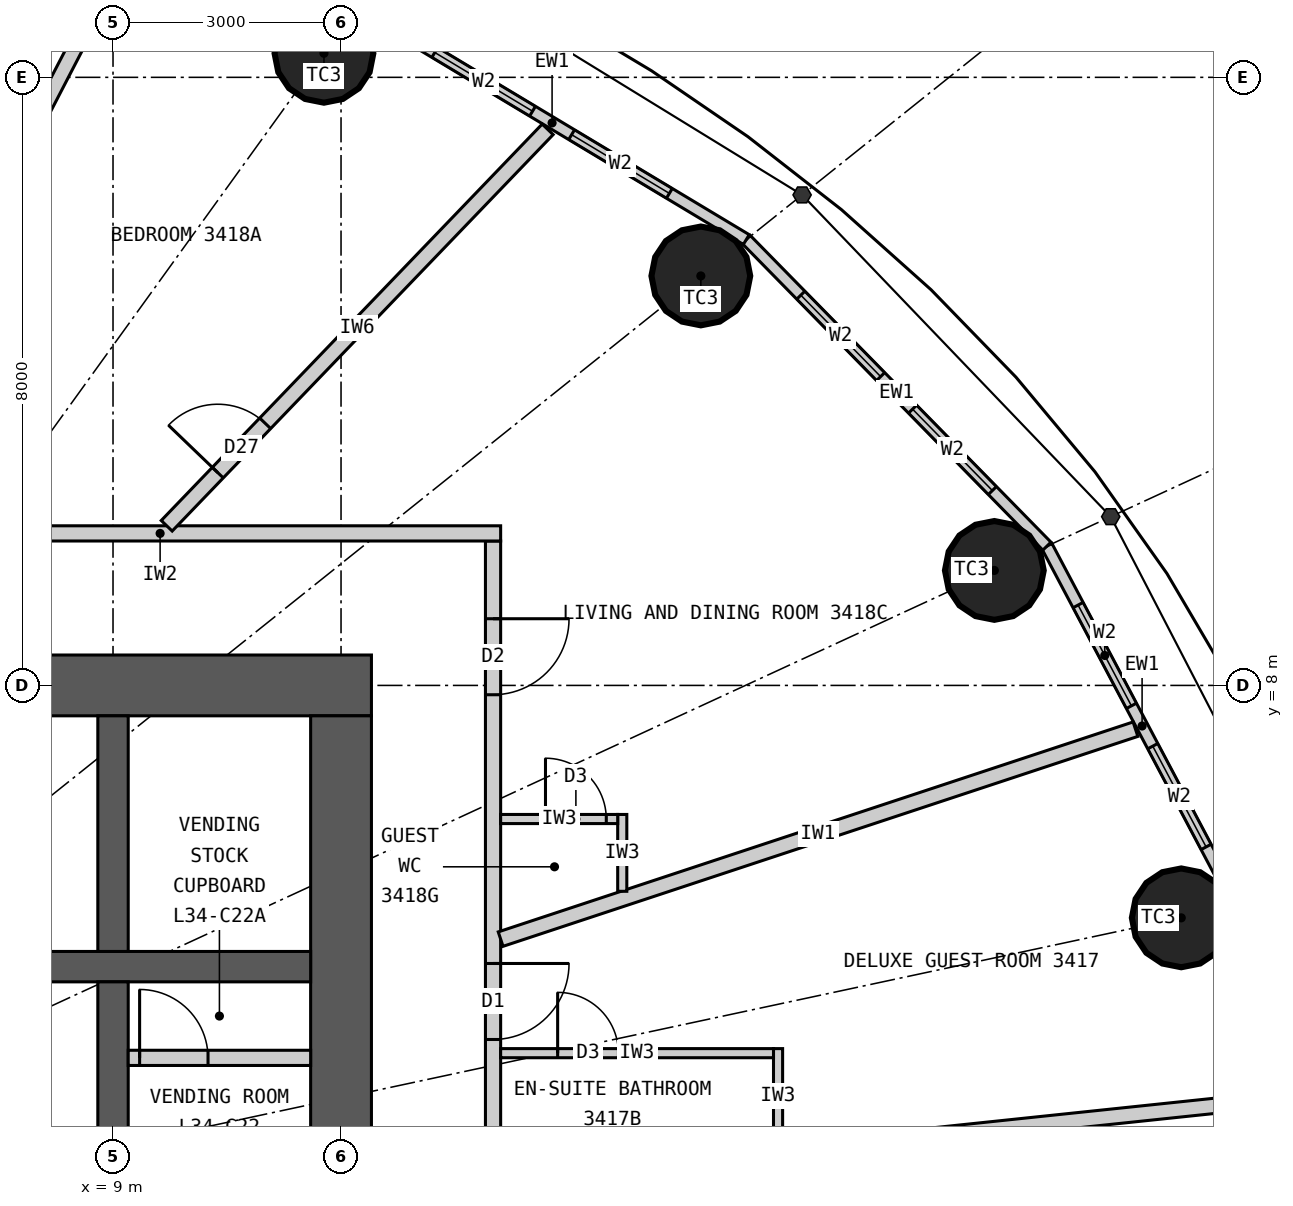
"""IFC4 building model, lengths in metres.
Left out: names, types, materials, properties, quantities, classifications, styles, units other than length and angle.
Written with IfcOpenShell. Run it as: python <this file> out.ifc"""

import sys

from ifc_helpers import new_model, si_unit, direction, frame, frame_2d, origin, origin_2d, place, context, subcontext, project, spatial, rectangle, circle, extrude, element, fill, save


model = new_model("IFC4")
c1 = context("Model", 3, precision=1e-05, world=origin(), true_north=direction((0.0, 1.0)))
c2 = subcontext(c1, "Body", "Model", "MODEL_VIEW")
j1 = project(units=[si_unit("LENGTHUNIT", "METRE"), si_unit("PLANEANGLEUNIT", "RADIAN")], contexts=[c1])
p1 = place(None, origin())
s1 = spatial("IfcSite", under=j1, at=p1, CompositionType="ELEMENT")
p2 = place(p1, origin())
s2 = spatial("IfcBuilding", under=s1, at=p2, CompositionType="ELEMENT")
p3 = place(p2, frame((0.0, 0.0, 132.0)))
s3 = spatial("IfcBuildingStorey", under=s2, at=p3, CompositionType="ELEMENT", Elevation=132.0)
for number, where, z_axis, x_axis in (
    (1, (23.055, 4.942, 0.0), (0.0, 0.0, 1.0), (1.0, 0.0, 0.0)),
    (2, (20.596, 9.513, 0.0), (0.0, 0.0, 1.0), (1.0, 0.0, 0.0)),
    (3, (16.734, 13.387, 0.0), (0.0, 0.0, 1.0), (1.0, 0.0, 0.0)),
    (4, (11.775, 16.316, 0.0), (0.0, 0.0, 1.0), (1.0, 0.0, 0.0)),
):
    element("IfcColumn", number, at=place(p3, frame(where, z_axis=z_axis, x_axis=x_axis)), inside=s3, PredefinedType="COLUMN", context=c2, shape_type="SweptSolid", body=[
        extrude(circle(Radius=0.65, at=origin_2d()), origin(), (0.0, 0.0, 1.0), 3.3),
    ])
p4 = place(p3, frame((-12.4, 8.0, 0.0), z_axis=(0.0, 0.0, 1.0), x_axis=(1.0, 0.0, 0.0)))
e5 = element("IfcWall", 5, at=p4, inside=s3, PredefinedType="SHEAR", context=c2, shape_type="SweptSolid", body=[
    extrude(rectangle(XDim=24.8, YDim=0.8, at=frame_2d((12.4, 0.0))), origin(), (0.0, 0.0, 1.0), 3.3),
])
p5 = place(p4, frame((11.1, 0.0, 0.0)))
e6 = element("IfcOpeningElement", 6, at=p5, cuts=e5, PredefinedType="OPENING", context=c2, shape_type="SweptSolid", body=[
    extrude(rectangle(XDim=1.2, YDim=2.2, at=frame_2d((0.6, 1.1))), frame((0.0, 0.41, 0.0), z_axis=(0.0, -1.0, 0.0), x_axis=(1.0, 0.0, 0.0)), (0.0, 0.0, 1.0), 0.82),
])
p6 = place(p4, frame((18.7, 0.0, 0.0)))
e7 = element("IfcOpeningElement", 7, at=p6, cuts=e5, PredefinedType="OPENING", context=c2, shape_type="SweptSolid", body=[
    extrude(rectangle(XDim=0.9, YDim=2.2, at=frame_2d((0.45, 1.1))), frame((0.0, 0.41, 0.0), z_axis=(0.0, -1.0, 0.0), x_axis=(1.0, 0.0, 0.0)), (0.0, 0.0, 1.0), 0.82),
])
p7 = place(p3, frame((12.0, -7.6, 0.0), z_axis=(0.0, 0.0, 1.0), x_axis=(0.0, 1.0, 0.0)))
e8 = element("IfcWall", 8, at=p7, inside=s3, PredefinedType="SHEAR", context=c2, shape_type="SweptSolid", body=[
    extrude(rectangle(XDim=15.2, YDim=0.8, at=frame_2d((7.6, 0.0))), origin(), (0.0, 0.0, 1.0), 3.3),
])
p8 = place(p7, frame((6.7, 0.0, 0.0)))
e9 = element("IfcOpeningElement", 9, at=p8, cuts=e8, PredefinedType="OPENING", context=c2, shape_type="SweptSolid", body=[
    extrude(rectangle(XDim=1.8, YDim=2.2, at=frame_2d((0.9, 1.1))), frame((0.0, 0.41, 0.0), z_axis=(0.0, -1.0, 0.0), x_axis=(1.0, 0.0, 0.0)), (0.0, 0.0, 1.0), 0.82),
])
p9 = place(p3, frame((-11.6, 4.3, 0.0), z_axis=(0.0, 0.0, 1.0), x_axis=(1.0, 0.0, 0.0)))
e10 = element("IfcWall", 10, at=p9, inside=s3, PredefinedType="SHEAR", context=c2, shape_type="SweptSolid", body=[
    extrude(rectangle(XDim=23.2, YDim=0.4, at=frame_2d((11.6, 0.0))), origin(), (0.0, 0.0, 1.0), 3.3),
])
p10 = place(p3, frame((9.0, 4.5, 0.0), z_axis=(0.0, 0.0, 1.0), x_axis=(0.0, 1.0, 0.0)))
e11 = element("IfcWall", 11, at=p10, inside=s3, PredefinedType="SHEAR", context=c2, shape_type="SweptSolid", body=[
    extrude(rectangle(XDim=3.1, YDim=0.4, at=frame_2d((1.55, 0.0))), origin(), (0.0, 0.0, 1.0), 3.3),
])
p11 = place(p3, frame((9.0, 1.75, 0.0), z_axis=(0.0, 0.0, 1.0), x_axis=(0.0, 1.0, 0.0)))
e12 = element("IfcWall", 12, at=p11, inside=s3, PredefinedType="SHEAR", context=c2, shape_type="SweptSolid", body=[
    extrude(rectangle(XDim=2.35, YDim=0.4, at=frame_2d((1.175, 0.0))), origin(), (0.0, 0.0, 1.0), 3.3),
])
p12 = place(p3, frame((23.792, 5.1, 0.0), z_axis=(0.0, 0.0, 1.0), x_axis=(-0.467814388454, 0.883826735257, 0.0)))
e13 = element("IfcWall", 13, at=p12, inside=s3, PredefinedType="ELEMENTEDWALL", context=c2, shape_type="SweptSolid", body=[
    extrude(rectangle(XDim=5.354, YDim=0.15, at=frame_2d((2.677, 0.0))), origin(), (0.0, 0.0, 1.0), 3.12),
])
p13 = place(p12, frame((0.877, 0.0, 0.9)))
e14 = element("IfcOpeningElement", 14, at=p13, cuts=e13, PredefinedType="OPENING", context=c2, shape_type="SweptSolid", body=[
    extrude(rectangle(XDim=1.5, YDim=1.9, at=frame_2d((0.75, 0.95))), frame((0.0, 0.085, 0.0), z_axis=(0.0, -1.0, 0.0), x_axis=(1.0, 0.0, 0.0)), (0.0, 0.0, 1.0), 0.17),
])
p14 = place(p12, frame((2.977, 0.0, 0.9)))
e15 = element("IfcOpeningElement", 15, at=p14, cuts=e13, PredefinedType="OPENING", context=c2, shape_type="SweptSolid", body=[
    extrude(rectangle(XDim=1.5, YDim=1.9, at=frame_2d((0.75, 0.95))), frame((0.0, 0.085, 0.0), z_axis=(0.0, -1.0, 0.0), x_axis=(1.0, 0.0, 0.0)), (0.0, 0.0, 1.0), 0.17),
])
p15 = place(p3, frame((21.287, 9.832, 0.0), z_axis=(0.0, 0.0, 1.0), x_axis=(-0.700136650834, 0.714008872605, 0.0)))
e16 = element("IfcWall", 16, at=p15, inside=s3, PredefinedType="ELEMENTEDWALL", context=c2, shape_type="SweptSolid", body=[
    extrude(rectangle(XDim=5.649, YDim=0.15, at=frame_2d((2.825, 0.0))), origin(), (0.0, 0.0, 1.0), 3.12),
])
p16 = place(p15, frame((1.025, 0.0, 0.9)))
e17 = element("IfcOpeningElement", 17, at=p16, cuts=e16, PredefinedType="OPENING", context=c2, shape_type="SweptSolid", body=[
    extrude(rectangle(XDim=1.5, YDim=1.9, at=frame_2d((0.75, 0.95))), frame((0.0, 0.085, 0.0), z_axis=(0.0, -1.0, 0.0), x_axis=(1.0, 0.0, 0.0)), (0.0, 0.0, 1.0), 0.17),
])
p17 = place(p15, frame((3.125, 0.0, 0.9)))
e18 = element("IfcOpeningElement", 18, at=p17, cuts=e16, PredefinedType="OPENING", context=c2, shape_type="SweptSolid", body=[
    extrude(rectangle(XDim=1.5, YDim=1.9, at=frame_2d((0.75, 0.95))), frame((0.0, 0.085, 0.0), z_axis=(0.0, -1.0, 0.0), x_axis=(1.0, 0.0, 0.0)), (0.0, 0.0, 1.0), 0.17),
])
p18 = place(p3, frame((17.332, 13.866, 0.0), z_axis=(0.0, 0.0, 1.0), x_axis=(-0.857308573723, 0.514802884044, 0.0)))
e19 = element("IfcWall", 19, at=p18, inside=s3, PredefinedType="ELEMENTEDWALL", context=c2, shape_type="SweptSolid", body=[
    extrude(rectangle(XDim=5.961, YDim=0.15, at=frame_2d((2.98, 0.0))), origin(), (0.0, 0.0, 1.0), 3.12),
])
p19 = place(p18, frame((1.181, 0.0, 0.9)))
e20 = element("IfcOpeningElement", 20, at=p19, cuts=e19, PredefinedType="OPENING", context=c2, shape_type="SweptSolid", body=[
    extrude(rectangle(XDim=1.5, YDim=1.9, at=frame_2d((0.75, 0.95))), frame((0.0, 0.085, 0.0), z_axis=(0.0, -1.0, 0.0), x_axis=(1.0, 0.0, 0.0)), (0.0, 0.0, 1.0), 0.17),
])
p20 = place(p18, frame((3.281, 0.0, 0.9)))
e21 = element("IfcOpeningElement", 21, at=p20, cuts=e19, PredefinedType="OPENING", context=c2, shape_type="SweptSolid", body=[
    extrude(rectangle(XDim=1.5, YDim=1.9, at=frame_2d((0.75, 0.95))), frame((0.0, 0.085, 0.0), z_axis=(0.0, -1.0, 0.0), x_axis=(1.0, 0.0, 0.0)), (0.0, 0.0, 1.0), 0.17),
])
p21 = place(p3, frame((14.0, -9.9, 0.0), z_axis=(0.0, 0.0, 1.0), x_axis=(0.0, 1.0, 0.0)))
e22 = element("IfcWall", 22, at=p21, inside=s3, PredefinedType="PARTITIONING", context=c2, shape_type="SweptSolid", body=[
    extrude(rectangle(XDim=19.8, YDim=0.2, at=frame_2d((9.9, 0.0))), origin(), (0.0, 0.0, 1.0), 3.12),
])
p22 = place(p21, frame((1.025, 0.0, 0.0)))
e23 = element("IfcOpeningElement", 23, at=p22, cuts=e22, PredefinedType="OPENING", context=c2, shape_type="SweptSolid", body=[
    extrude(rectangle(XDim=1.0, YDim=2.2, at=frame_2d((0.5, 1.1))), frame((0.0, 0.11, 0.0), z_axis=(0.0, -1.0, 0.0), x_axis=(1.0, 0.0, 0.0)), (0.0, 0.0, 1.0), 0.22),
])
p23 = place(p21, frame((6.798, 0.0, 0.0)))
e24 = element("IfcOpeningElement", 24, at=p23, cuts=e22, PredefinedType="OPENING", context=c2, shape_type="SweptSolid", body=[
    extrude(rectangle(XDim=1.0, YDim=2.2, at=frame_2d((0.5, 1.1))), frame((0.0, 0.11, 0.0), z_axis=(0.0, -1.0, 0.0), x_axis=(1.0, 0.0, 0.0)), (0.0, 0.0, 1.0), 0.22),
])
p24 = place(p21, frame((13.242, 0.0, 0.0)))
e25 = element("IfcOpeningElement", 25, at=p24, cuts=e22, PredefinedType="OPENING", context=c2, shape_type="SweptSolid", body=[
    extrude(rectangle(XDim=1.0, YDim=2.2, at=frame_2d((0.5, 1.1))), frame((0.0, 0.11, 0.0), z_axis=(0.0, -1.0, 0.0), x_axis=(1.0, 0.0, 0.0)), (0.0, 0.0, 1.0), 0.22),
])
p25 = place(p21, frame((17.777, 0.0, 0.0)))
e26 = element("IfcOpeningElement", 26, at=p25, cuts=e22, PredefinedType="OPENING", context=c2, shape_type="SweptSolid", body=[
    extrude(rectangle(XDim=1.0, YDim=2.2, at=frame_2d((0.5, 1.1))), frame((0.0, 0.11, 0.0), z_axis=(0.0, -1.0, 0.0), x_axis=(1.0, 0.0, 0.0)), (0.0, 0.0, 1.0), 0.22),
])
p26 = place(p3, frame((5.139, 10.0, 0.0), z_axis=(0.0, 0.0, 1.0), x_axis=(1.0, 0.0, 0.0)))
e27 = element("IfcWall", 27, at=p26, inside=s3, PredefinedType="PARTITIONING", context=c2, shape_type="SweptSolid", body=[
    extrude(rectangle(XDim=8.961, YDim=0.2, at=frame_2d((4.48, 0.0))), origin(), (0.0, 0.0, 1.0), 3.12),
])
p27 = place(p3, frame((14.1, 1.482, 0.0), z_axis=(0.0, 0.0, 1.0), x_axis=(0.994523202615, 0.104516024894, 0.0)))
e28 = element("IfcWall", 28, at=p27, inside=s3, PredefinedType="PARTITIONING", context=c2, shape_type="SweptSolid", body=[
    extrude(rectangle(XDim=10.091, YDim=0.2, at=frame_2d((5.045, 0.0))), origin(), (0.0, 0.0, 1.0), 2.37),
])
p28 = place(p3, frame((14.1, 4.662, 0.0), z_axis=(0.0, 0.0, 1.0), x_axis=(0.949446466373, 0.313928984789, 0.0)))
e29 = element("IfcWall", 29, at=p28, inside=s3, PredefinedType="PARTITIONING", context=c2, shape_type="SweptSolid", body=[
    extrude(rectangle(XDim=8.797, YDim=0.2, at=frame_2d((4.399, 0.0))), origin(), (0.0, 0.0, 1.0), 3.12),
])
p29 = place(p3, frame((9.706, 10.1, 0.0), z_axis=(0.0, 0.0, 1.0), x_axis=(0.692944801824, 0.720990639069, 0.0)))
e30 = element("IfcWall", 30, at=p29, inside=s3, PredefinedType="PARTITIONING", context=c2, shape_type="SweptSolid", body=[
    extrude(rectangle(XDim=7.234, YDim=0.2, at=frame_2d((3.617, 0.0))), origin(), (0.0, 0.0, 1.0), 3.12),
])
p30 = place(p29, frame((0.97, 0.0, 0.0)))
e31 = element("IfcOpeningElement", 31, at=p30, cuts=e30, PredefinedType="OPENING", context=c2, shape_type="SweptSolid", body=[
    extrude(rectangle(XDim=0.9, YDim=2.1, at=frame_2d((0.45, 1.05))), frame((0.0, 0.11, 0.0), z_axis=(0.0, -1.0, 0.0), x_axis=(1.0, 0.0, 0.0)), (0.0, 0.0, 1.0), 0.22),
])
p31 = place(p3, frame((5.239, 10.1, 0.0), z_axis=(0.0, 0.0, 1.0), x_axis=(0.4604797896, 0.887670188398, 0.0)))
e32 = element("IfcWall", 32, at=p31, inside=s3, PredefinedType="PARTITIONING", context=c2, shape_type="SweptSolid", body=[
    extrude(rectangle(XDim=8.676, YDim=0.2, at=frame_2d((4.338, 0.0))), origin(), (0.0, 0.0, 1.0), 3.12),
])
p32 = place(p3, frame((17.75, 1.965, 0.0), z_axis=(0.0, 0.0, 1.0), x_axis=(0.0, 1.0, 0.0)))
e33 = element("IfcWall", 33, at=p32, inside=s3, PredefinedType="PARTITIONING", context=c2, shape_type="SweptSolid", body=[
    extrude(rectangle(XDim=1.256, YDim=0.12, at=frame_2d((0.628, 0.0))), origin(), (0.0, 0.0, 1.0), 3.12),
])
p33 = place(p3, frame((14.1, 3.162, 0.0), z_axis=(0.0, 0.0, 1.0), x_axis=(1.0, 0.0, 0.0)))
e34 = element("IfcWall", 34, at=p33, inside=s3, PredefinedType="PARTITIONING", context=c2, shape_type="SweptSolid", body=[
    extrude(rectangle(XDim=3.59, YDim=0.12, at=frame_2d((1.795, 0.0))), origin(), (0.0, 0.0, 1.0), 3.12),
])
p34 = place(p33, frame((0.75, 0.0, 0.0)))
e35 = element("IfcOpeningElement", 35, at=p34, cuts=e34, PredefinedType="OPENING", context=c2, shape_type="SweptSolid", body=[
    extrude(rectangle(XDim=0.8, YDim=2.1, at=frame_2d((0.4, 1.05))), frame((0.0, 0.07, 0.0), z_axis=(0.0, -1.0, 0.0), x_axis=(1.0, 0.0, 0.0)), (0.0, 0.0, 1.0), 0.14),
])
p35 = place(p3, frame((15.7, 5.291, 0.0), z_axis=(0.0, 0.0, 1.0), x_axis=(0.0, 1.0, 0.0)))
e36 = element("IfcWall", 36, at=p35, inside=s3, PredefinedType="PARTITIONING", context=c2, shape_type="SweptSolid", body=[
    extrude(rectangle(XDim=1.011, YDim=0.12, at=frame_2d((0.505, 0.0))), origin(), (0.0, 0.0, 1.0), 3.12),
])
p36 = place(p3, frame((14.1, 6.242, 0.0), z_axis=(0.0, 0.0, 1.0), x_axis=(1.0, 0.0, 0.0)))
e37 = element("IfcWall", 37, at=p36, inside=s3, PredefinedType="PARTITIONING", context=c2, shape_type="SweptSolid", body=[
    extrude(rectangle(XDim=1.54, YDim=0.12, at=frame_2d((0.77, 0.0))), origin(), (0.0, 0.0, 1.0), 3.12),
])
p37 = place(p36, frame((0.59, 0.0, 0.0)))
e38 = element("IfcOpeningElement", 38, at=p37, cuts=e37, PredefinedType="OPENING", context=c2, shape_type="SweptSolid", body=[
    extrude(rectangle(XDim=0.8, YDim=2.1, at=frame_2d((0.4, 1.05))), frame((0.0, 0.07, 0.0), z_axis=(0.0, -1.0, 0.0), x_axis=(1.0, 0.0, 0.0)), (0.0, 0.0, 1.0), 0.14),
])
p38 = place(p3, frame((9.2, 3.1, 0.0), z_axis=(0.0, 0.0, 1.0), x_axis=(1.0, 0.0, 0.0)))
e39 = element("IfcWall", 39, at=p38, inside=s3, PredefinedType="PARTITIONING", context=c2, shape_type="SweptSolid", body=[
    extrude(rectangle(XDim=2.4, YDim=0.2, at=frame_2d((1.2, 0.0))), origin(), (0.0, 0.0, 1.0), 3.12),
])
p39 = place(p38, frame((0.15, 0.0, 0.0)))
e40 = element("IfcOpeningElement", 40, at=p39, cuts=e39, PredefinedType="OPENING", context=c2, shape_type="SweptSolid", body=[
    extrude(rectangle(XDim=0.9, YDim=2.2, at=frame_2d((0.45, 1.1))), frame((0.0, 0.11, 0.0), z_axis=(0.0, -1.0, 0.0), x_axis=(1.0, 0.0, 0.0)), (0.0, 0.0, 1.0), 0.22),
])
p40 = place(p13, origin())
e41 = element("IfcWindow", 41, at=p40, inside=s3, PartitioningType="SINGLE_PANEL", PredefinedType="WINDOW", context=c2, shape_type="SweptSolid", body=[
    extrude(rectangle(XDim=1.5, YDim=1.9, at=frame_2d((0.75, 0.95))), frame((0.0, 0.03, 0.0), z_axis=(0.0, -1.0, 0.0), x_axis=(1.0, 0.0, 0.0)), (0.0, 0.0, 1.0), 0.06),
])
fill(e14, e41)
p41 = place(p14, origin())
e42 = element("IfcWindow", 42, at=p41, inside=s3, PartitioningType="SINGLE_PANEL", PredefinedType="WINDOW", context=c2, shape_type="SweptSolid", body=[
    extrude(rectangle(XDim=1.5, YDim=1.9, at=frame_2d((0.75, 0.95))), frame((0.0, 0.03, 0.0), z_axis=(0.0, -1.0, 0.0), x_axis=(1.0, 0.0, 0.0)), (0.0, 0.0, 1.0), 0.06),
])
fill(e15, e42)
p42 = place(p16, origin())
e43 = element("IfcWindow", 43, at=p42, inside=s3, PartitioningType="SINGLE_PANEL", PredefinedType="WINDOW", context=c2, shape_type="SweptSolid", body=[
    extrude(rectangle(XDim=1.5, YDim=1.9, at=frame_2d((0.75, 0.95))), frame((0.0, 0.03, 0.0), z_axis=(0.0, -1.0, 0.0), x_axis=(1.0, 0.0, 0.0)), (0.0, 0.0, 1.0), 0.06),
])
fill(e17, e43)
p43 = place(p17, origin())
e44 = element("IfcWindow", 44, at=p43, inside=s3, PartitioningType="SINGLE_PANEL", PredefinedType="WINDOW", context=c2, shape_type="SweptSolid", body=[
    extrude(rectangle(XDim=1.5, YDim=1.9, at=frame_2d((0.75, 0.95))), frame((0.0, 0.03, 0.0), z_axis=(0.0, -1.0, 0.0), x_axis=(1.0, 0.0, 0.0)), (0.0, 0.0, 1.0), 0.06),
])
fill(e18, e44)
p44 = place(p19, origin())
e45 = element("IfcWindow", 45, at=p44, inside=s3, PartitioningType="SINGLE_PANEL", PredefinedType="WINDOW", context=c2, shape_type="SweptSolid", body=[
    extrude(rectangle(XDim=1.5, YDim=1.9, at=frame_2d((0.75, 0.95))), frame((0.0, 0.03, 0.0), z_axis=(0.0, -1.0, 0.0), x_axis=(1.0, 0.0, 0.0)), (0.0, 0.0, 1.0), 0.06),
])
fill(e20, e45)
p45 = place(p20, origin())
e46 = element("IfcWindow", 46, at=p45, inside=s3, PartitioningType="SINGLE_PANEL", PredefinedType="WINDOW", context=c2, shape_type="SweptSolid", body=[
    extrude(rectangle(XDim=1.5, YDim=1.9, at=frame_2d((0.75, 0.95))), frame((0.0, 0.03, 0.0), z_axis=(0.0, -1.0, 0.0), x_axis=(1.0, 0.0, 0.0)), (0.0, 0.0, 1.0), 0.06),
])
fill(e21, e46)
p46 = place(p34, origin())
e47 = element("IfcDoor", 47, at=p46, inside=s3, OperationType="SINGLE_SWING_LEFT", PredefinedType="DOOR", context=c2, shape_type="SweptSolid", body=[
    extrude(rectangle(XDim=0.8, YDim=2.1, at=frame_2d((0.4, 1.05))), frame((0.0, 0.025, 0.0), z_axis=(0.0, -1.0, 0.0), x_axis=(1.0, 0.0, 0.0)), (0.0, 0.0, 1.0), 0.05),
])
fill(e35, e47)
p47 = place(p24, origin())
e48 = element("IfcDoor", 48, at=p47, inside=s3, OperationType="SINGLE_SWING_RIGHT", PredefinedType="DOOR", context=c2, shape_type="SweptSolid", body=[
    extrude(rectangle(XDim=1.0, YDim=2.2, at=frame_2d((0.5, 1.1))), frame((0.0, 0.025, 0.0), z_axis=(0.0, -1.0, 0.0), x_axis=(1.0, 0.0, 0.0)), (0.0, 0.0, 1.0), 0.05),
])
fill(e25, e48)
p48 = place(p37, origin())
e49 = element("IfcDoor", 49, at=p48, inside=s3, OperationType="SINGLE_SWING_LEFT", PredefinedType="DOOR", context=c2, shape_type="SweptSolid", body=[
    extrude(rectangle(XDim=0.8, YDim=2.1, at=frame_2d((0.4, 1.05))), frame((0.0, 0.025, 0.0), z_axis=(0.0, -1.0, 0.0), x_axis=(1.0, 0.0, 0.0)), (0.0, 0.0, 1.0), 0.05),
])
fill(e38, e49)
p49 = place(p25, origin())
e50 = element("IfcDoor", 50, at=p49, inside=s3, OperationType="SINGLE_SWING_RIGHT", PredefinedType="DOOR", context=c2, shape_type="SweptSolid", body=[
    extrude(rectangle(XDim=1.0, YDim=2.2, at=frame_2d((0.5, 1.1))), frame((0.0, 0.025, 0.0), z_axis=(0.0, -1.0, 0.0), x_axis=(1.0, 0.0, 0.0)), (0.0, 0.0, 1.0), 0.05),
])
fill(e26, e50)
p50 = place(p30, origin())
e51 = element("IfcDoor", 51, at=p50, inside=s3, OperationType="SINGLE_SWING_LEFT", PredefinedType="DOOR", context=c2, shape_type="SweptSolid", body=[
    extrude(rectangle(XDim=0.9, YDim=2.1, at=frame_2d((0.45, 1.05))), frame((0.0, 0.025, 0.0), z_axis=(0.0, -1.0, 0.0), x_axis=(1.0, 0.0, 0.0)), (0.0, 0.0, 1.0), 0.05),
])
fill(e31, e51)
p51 = place(p39, origin())
e52 = element("IfcDoor", 52, at=p51, inside=s3, OperationType="SINGLE_SWING_LEFT", PredefinedType="DOOR", context=c2, shape_type="SweptSolid", body=[
    extrude(rectangle(XDim=0.9, YDim=2.2, at=frame_2d((0.45, 1.1))), frame((0.0, 0.025, 0.0), z_axis=(0.0, -1.0, 0.0), x_axis=(1.0, 0.0, 0.0)), (0.0, 0.0, 1.0), 0.05),
])
fill(e40, e52)
save(model, sys.argv[1])
